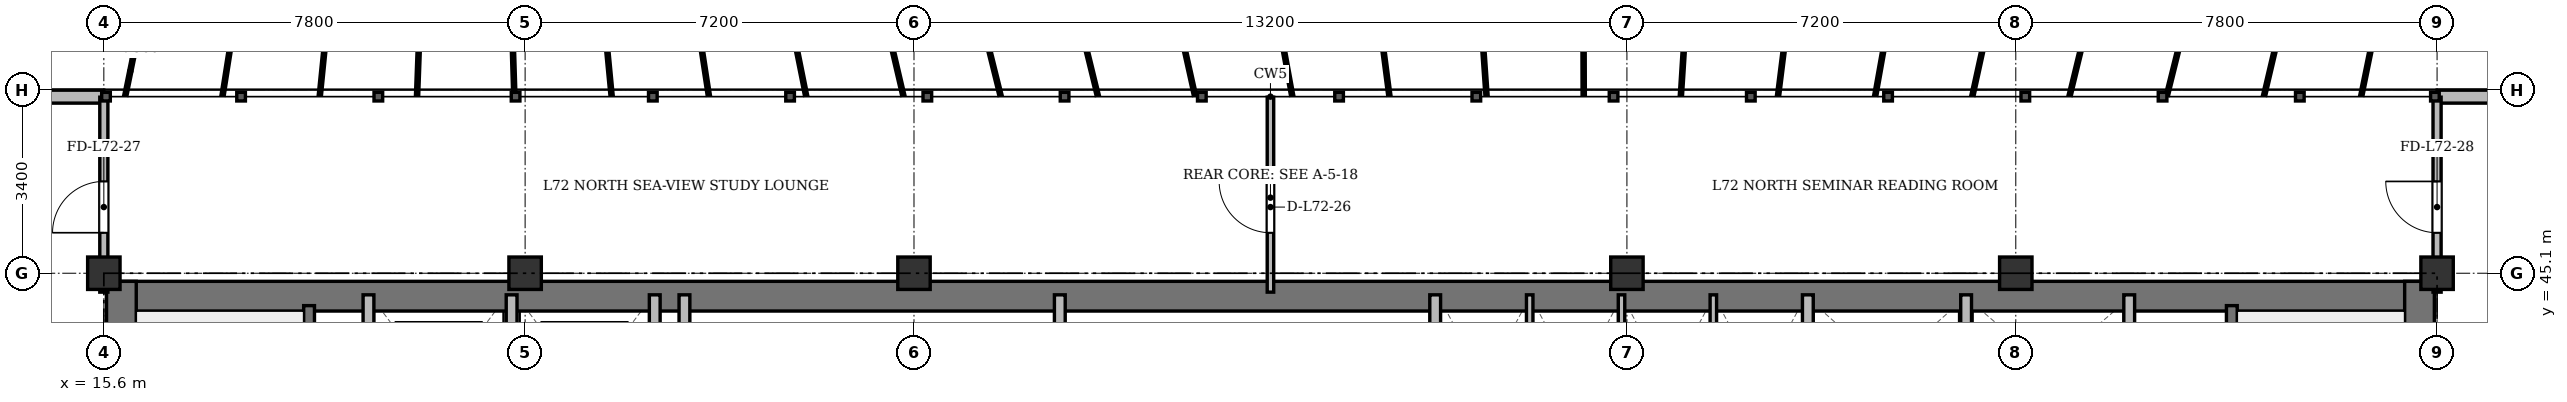
"""IFC4 building model, lengths in metres.
Left out: names, types, materials, properties, quantities, classifications, styles, units other than length and angle.
Written with IfcOpenShell. Run it as: python <this file> out.ifc"""

import sys

from ifc_helpers import new_model, si_unit, direction, frame, frame_2d, origin, origin_2d, place, context, subcontext, project, spatial, rectangle, extrude, source, transform, mapped, element, fill, save


model = new_model("IFC4")
c1 = context("Model", 3, precision=1e-05, world=origin(), true_north=direction((0.0, 1.0)))
c2 = subcontext(c1, "Body", "Model", "MODEL_VIEW")
j1 = project(units=[si_unit("LENGTHUNIT", "METRE"), si_unit("PLANEANGLEUNIT", "RADIAN")], contexts=[c1])
p1 = place(None, origin())
s1 = spatial("IfcSite", under=j1, at=p1, CompositionType="ELEMENT")
p2 = place(p1, origin())
s2 = spatial("IfcBuilding", under=s1, at=p2, CompositionType="ELEMENT")
p3 = place(p2, frame((0.0, 0.0, 277.5)))
s3 = spatial("IfcBuildingStorey", under=s2, at=p3, CompositionType="ELEMENT", Elevation=277.5)
m1 = source(origin(), c2, "Body", "SweptSolid", [
    extrude(rectangle(XDim=0.6, YDim=0.6, at=origin_2d()), origin(), (0.0, 0.0, 1.0), 3.6),
])
for number, where, z_axis, x_axis in (
    (1, (15.6, 45.1, 0.0), (0.0, 0.0, 1.0), (1.0, 0.0, 0.0)),
    (2, (23.4, 45.1, 0.0), (0.0, 0.0, 1.0), (1.0, 0.0, 0.0)),
    (3, (30.6, 45.1, 0.0), (0.0, 0.0, 1.0), (1.0, 0.0, 0.0)),
    (4, (43.8, 45.1, 0.0), (0.0, 0.0, 1.0), (1.0, 0.0, 0.0)),
    (5, (51.0, 45.1, 0.0), (0.0, 0.0, 1.0), (1.0, 0.0, 0.0)),
    (6, (58.8, 45.1, 0.0), (0.0, 0.0, 1.0), (1.0, 0.0, 0.0)),
):
    element("IfcColumn", number, at=place(p3, frame(where, z_axis=z_axis, x_axis=x_axis)), inside=s3, PredefinedType="COLUMN", context=c2, shape_type="MappedRepresentation", body=[
        mapped(m1, transform((0.0, 0.0, 0.0), x_axis=(1.0, 0.0, 0.0), y_axis=(0.0, 1.0, 0.0), z_axis=(0.0, 0.0, 1.0), scale=1.0)),
    ])
p4 = place(p3, frame((11.3, 48.37, 0.0), z_axis=(0.0, 0.0, 1.0), x_axis=(1.0, 0.0, 0.0)))
e7 = element("IfcWall", 7, at=p4, inside=s3, PredefinedType="SOLIDWALL", context=c2, shape_type="SweptSolid", body=[
    extrude(rectangle(XDim=4.3, YDim=0.24, at=frame_2d((2.15, 0.0))), origin(), (0.0, 0.0, 1.0), 3.37),
])
p5 = place(p4, frame((1.46, 0.0, 0.9)))
e8 = element("IfcOpeningElement", 8, at=p5, cuts=e7, PredefinedType="OPENING", context=c2, shape_type="SweptSolid", body=[
    extrude(rectangle(XDim=1.2, YDim=1.65, at=frame_2d((0.6, 0.825))), frame((0.0, 0.13, 0.0), z_axis=(0.0, -1.0, 0.0), x_axis=(1.0, 0.0, 0.0)), (0.0, 0.0, 1.0), 0.26),
])
p6 = place(p3, frame((58.8, 48.37, 0.0), z_axis=(0.0, 0.0, 1.0), x_axis=(1.0, 0.0, 0.0)))
e9 = element("IfcWall", 9, at=p6, inside=s3, PredefinedType="SOLIDWALL", context=c2, shape_type="SweptSolid", body=[
    extrude(rectangle(XDim=4.3, YDim=0.24, at=frame_2d((2.15, 0.0))), origin(), (0.0, 0.0, 1.0), 3.37),
])
p7 = place(p6, frame((1.169, 0.0, 0.9)))
e10 = element("IfcOpeningElement", 10, at=p7, cuts=e9, PredefinedType="OPENING", context=c2, shape_type="SweptSolid", body=[
    extrude(rectangle(XDim=1.2, YDim=1.65, at=frame_2d((0.6, 0.825))), frame((0.0, 0.13, 0.0), z_axis=(0.0, -1.0, 0.0), x_axis=(1.0, 0.0, 0.0)), (0.0, 0.0, 1.0), 0.26),
])
p8 = place(p3, frame((15.65, 44.675, 0.0), z_axis=(0.0, 0.0, 1.0), x_axis=(1.0, 0.0, 0.0)))
e11 = element("IfcWall", 11, at=p8, inside=s3, PredefinedType="SHEAR", context=c2, shape_type="SweptSolid", body=[
    extrude(rectangle(XDim=43.1, YDim=0.55, at=frame_2d((21.55, 0.0))), origin(), (0.0, 0.0, 1.0), 3.37),
])
for number, where, z_axis, x_axis in (
    (12, (15.925, 33.4, 0.0), (0.0, 0.0, 1.0), (0.0, 1.0, 0.0)),
    (13, (58.475, 33.4, 0.0), (0.0, 0.0, 1.0), (0.0, 1.0, 0.0)),
):
    element("IfcWall", number, at=place(p3, frame(where, z_axis=z_axis, x_axis=x_axis)), inside=s3, PredefinedType="SHEAR", context=c2, shape_type="SweptSolid", body=[
        extrude(rectangle(XDim=11.55, YDim=0.55, at=frame_2d((5.775, 0.0))), origin(), (0.0, 0.0, 1.0), 3.37),
    ])
p9 = place(p3, frame((19.4, 33.4, 0.0), z_axis=(0.0, 0.0, 1.0), x_axis=(0.0, 1.0, 0.0)))
e14 = element("IfcWall", 14, at=p9, inside=s3, PredefinedType="SHEAR", context=c2, shape_type="SweptSolid", body=[
    extrude(rectangle(XDim=11.1, YDim=0.2, at=frame_2d((5.55, 0.0))), origin(), (0.0, 0.0, 1.0), 3.37),
])
p10 = place(p9, frame((0.85, 0.0, 0.0)))
e15 = element("IfcOpeningElement", 15, at=p10, cuts=e14, PredefinedType="OPENING", context=c2, shape_type="SweptSolid", body=[
    extrude(rectangle(XDim=1.1, YDim=2.15, at=frame_2d((0.55, 1.075))), frame((0.0, 0.11, 0.0), z_axis=(0.0, -1.0, 0.0), x_axis=(1.0, 0.0, 0.0)), (0.0, 0.0, 1.0), 0.22),
])
p11 = place(p3, frame((55.0, 33.4, 0.0), z_axis=(0.0, 0.0, 1.0), x_axis=(0.0, 1.0, 0.0)))
e16 = element("IfcWall", 16, at=p11, inside=s3, PredefinedType="SHEAR", context=c2, shape_type="SweptSolid", body=[
    extrude(rectangle(XDim=11.1, YDim=0.2, at=frame_2d((5.55, 0.0))), origin(), (0.0, 0.0, 1.0), 3.37),
])
p12 = place(p11, frame((0.85, 0.0, 0.0)))
e17 = element("IfcOpeningElement", 17, at=p12, cuts=e16, PredefinedType="OPENING", context=c2, shape_type="SweptSolid", body=[
    extrude(rectangle(XDim=1.1, YDim=2.15, at=frame_2d((0.55, 1.075))), frame((0.0, 0.11, 0.0), z_axis=(0.0, -1.0, 0.0), x_axis=(1.0, 0.0, 0.0)), (0.0, 0.0, 1.0), 0.22),
])
for number, where, z_axis, x_axis in (
    (18, (20.5, 41.3, 0.0), (0.0, 0.0, 1.0), (0.0, 1.0, 0.0)),
    (19, (23.15, 41.3, 0.0), (0.0, 0.0, 1.0), (0.0, 1.0, 0.0)),
    (20, (25.8, 41.3, 0.0), (0.0, 0.0, 1.0), (0.0, 1.0, 0.0)),
):
    element("IfcWall", number, at=place(p3, frame(where, z_axis=z_axis, x_axis=x_axis)), inside=s3, PredefinedType="SOLIDWALL", context=c2, shape_type="SweptSolid", body=[
        extrude(rectangle(XDim=3.4, YDim=0.2, at=frame_2d((1.7, 0.0))), origin(), (0.0, 0.0, 1.0), 3.37),
    ])
for number, where, z_axis, x_axis in (
    (21, (26.35, 33.4, 0.0), (0.0, 0.0, 1.0), (0.0, 1.0, 0.0)),
    (22, (33.3, 33.4, 0.0), (0.0, 0.0, 1.0), (0.0, 1.0, 0.0)),
):
    element("IfcWall", number, at=place(p3, frame(where, z_axis=z_axis, x_axis=x_axis)), inside=s3, PredefinedType="SOLIDWALL", context=c2, shape_type="SweptSolid", body=[
        extrude(rectangle(XDim=11.3, YDim=0.2, at=frame_2d((5.65, 0.0))), origin(), (0.0, 0.0, 1.0), 2.92),
    ])
p13 = place(p3, frame((40.25, 41.5, 0.0), z_axis=(0.0, 0.0, 1.0), x_axis=(0.0, 1.0, 0.0)))
e23 = element("IfcWall", 23, at=p13, inside=s3, PredefinedType="SOLIDWALL", context=c2, shape_type="SweptSolid", body=[
    extrude(rectangle(XDim=3.2, YDim=0.2, at=frame_2d((1.6, 0.0))), origin(), (0.0, 0.0, 1.0), 3.37),
])
for number, where, z_axis, x_axis in (
    (24, (42.0, 41.5, 0.0), (0.0, 0.0, 1.0), (0.0, 1.0, 0.0)),
    (25, (43.7, 41.5, 0.0), (0.0, 0.0, 1.0), (0.0, 1.0, 0.0)),
    (26, (45.4, 41.5, 0.0), (0.0, 0.0, 1.0), (0.0, 1.0, 0.0)),
):
    element("IfcWall", number, at=place(p3, frame(where, z_axis=z_axis, x_axis=x_axis)), inside=s3, PredefinedType="PARTITIONING", context=c2, shape_type="SweptSolid", body=[
        extrude(rectangle(XDim=3.2, YDim=0.12, at=frame_2d((1.6, 0.0))), origin(), (0.0, 0.0, 1.0), 3.37),
    ])
p14 = place(p3, frame((47.15, 33.4, 0.0), z_axis=(0.0, 0.0, 1.0), x_axis=(0.0, 1.0, 0.0)))
e27 = element("IfcWall", 27, at=p14, inside=s3, PredefinedType="SOLIDWALL", context=c2, shape_type="SweptSolid", body=[
    extrude(rectangle(XDim=11.3, YDim=0.2, at=frame_2d((5.65, 0.0))), origin(), (0.0, 0.0, 1.0), 2.92),
])
for number, where, z_axis, x_axis in (
    (28, (50.08, 42.05, 0.0), (0.0, 0.0, 1.0), (0.0, 1.0, 0.0)),
    (29, (53.1, 42.05, 0.0), (0.0, 0.0, 1.0), (0.0, 1.0, 0.0)),
):
    element("IfcWall", number, at=place(p3, frame(where, z_axis=z_axis, x_axis=x_axis)), inside=s3, PredefinedType="SOLIDWALL", context=c2, shape_type="SweptSolid", body=[
        extrude(rectangle(XDim=2.65, YDim=0.2, at=frame_2d((1.325, 0.0))), origin(), (0.0, 0.0, 1.0), 3.37),
    ])
p15 = place(p3, frame((37.2, 44.75, 0.0), z_axis=(0.0, 0.0, 1.0), x_axis=(0.0, 1.0, 0.0)))
e30 = element("IfcWall", 30, at=p15, inside=s3, PredefinedType="PARTITIONING", context=c2, shape_type="SweptSolid", body=[
    extrude(rectangle(XDim=3.61, YDim=0.12, at=frame_2d((1.805, 0.0))), origin(), (0.0, 0.0, 1.0), 2.92),
])
p16 = place(p15, frame((1.1, 0.0, 0.0)))
e31 = element("IfcOpeningElement", 31, at=p16, cuts=e30, PredefinedType="OPENING", context=c2, shape_type="SweptSolid", body=[
    extrude(rectangle(XDim=0.95, YDim=2.15, at=frame_2d((0.475, 1.075))), frame((0.0, 0.07, 0.0), z_axis=(0.0, -1.0, 0.0), x_axis=(1.0, 0.0, 0.0)), (0.0, 0.0, 1.0), 0.14),
])
p17 = place(p3, frame((15.6, 44.75, 0.0), z_axis=(0.0, 0.0, 1.0), x_axis=(0.0, 1.0, 0.0)))
e32 = element("IfcWall", 32, at=p17, inside=s3, PredefinedType="PARTITIONING", context=c2, shape_type="SweptSolid", body=[
    extrude(rectangle(XDim=3.61, YDim=0.15, at=frame_2d((1.805, 0.0))), origin(), (0.0, 0.0, 1.0), 2.87),
])
p18 = place(p17, frame((1.1, 0.0, 0.0)))
e33 = element("IfcOpeningElement", 33, at=p18, cuts=e32, PredefinedType="OPENING", context=c2, shape_type="SweptSolid", body=[
    extrude(rectangle(XDim=0.95, YDim=2.15, at=frame_2d((0.475, 1.075))), frame((0.0, 0.085, 0.0), z_axis=(0.0, -1.0, 0.0), x_axis=(1.0, 0.0, 0.0)), (0.0, 0.0, 1.0), 0.17),
])
p19 = place(p3, frame((58.8, 44.75, 0.0), z_axis=(0.0, 0.0, 1.0), x_axis=(0.0, 1.0, 0.0)))
e34 = element("IfcWall", 34, at=p19, inside=s3, PredefinedType="PARTITIONING", context=c2, shape_type="SweptSolid", body=[
    extrude(rectangle(XDim=3.61, YDim=0.15, at=frame_2d((1.805, 0.0))), origin(), (0.0, 0.0, 1.0), 2.87),
])
p20 = place(p19, frame((1.1, 0.0, 0.0)))
e35 = element("IfcOpeningElement", 35, at=p20, cuts=e34, PredefinedType="OPENING", context=c2, shape_type="SweptSolid", body=[
    extrude(rectangle(XDim=0.95, YDim=2.15, at=frame_2d((0.475, 1.075))), frame((0.0, 0.085, 0.0), z_axis=(0.0, -1.0, 0.0), x_axis=(1.0, 0.0, 0.0)), (0.0, 0.0, 1.0), 0.17),
])
m2 = source(origin(), c2, "Body", "SweptSolid", [
    extrude(rectangle(XDim=0.95, YDim=2.15, at=frame_2d((0.475, 1.075))), frame((0.0, 0.025, 0.0), z_axis=(0.0, -1.0, 0.0), x_axis=(1.0, 0.0, 0.0)), (0.0, 0.0, 1.0), 0.05),
])
p21 = place(p16, origin())
e36 = element("IfcDoor", 36, at=p21, inside=s3, OperationType="SINGLE_SWING_RIGHT", PredefinedType="DOOR", context=c2, shape_type="MappedRepresentation", body=[
    mapped(m2, transform((0.0, 0.0, 0.0), x_axis=(1.0, 0.0, 0.0), y_axis=(0.0, 1.0, 0.0), z_axis=(0.0, 0.0, 1.0), scale=1.0)),
])
fill(e31, e36)
p22 = place(p18, origin())
e37 = element("IfcDoor", 37, at=p22, inside=s3, OperationType="SINGLE_SWING_LEFT", PredefinedType="DOOR", context=c2, shape_type="MappedRepresentation", body=[
    mapped(m2, transform((0.0, 0.0, 0.0), x_axis=(1.0, 0.0, 0.0), y_axis=(0.0, 1.0, 0.0), z_axis=(0.0, 0.0, 1.0), scale=1.0)),
])
fill(e33, e37)
p23 = place(p20, origin())
e38 = element("IfcDoor", 38, at=p23, inside=s3, OperationType="SINGLE_SWING_RIGHT", PredefinedType="DOOR", context=c2, shape_type="MappedRepresentation", body=[
    mapped(m2, transform((0.0, 0.0, 0.0), x_axis=(1.0, 0.0, 0.0), y_axis=(0.0, 1.0, 0.0), z_axis=(0.0, 0.0, 1.0), scale=1.0)),
])
fill(e35, e38)
save(model, sys.argv[1])
